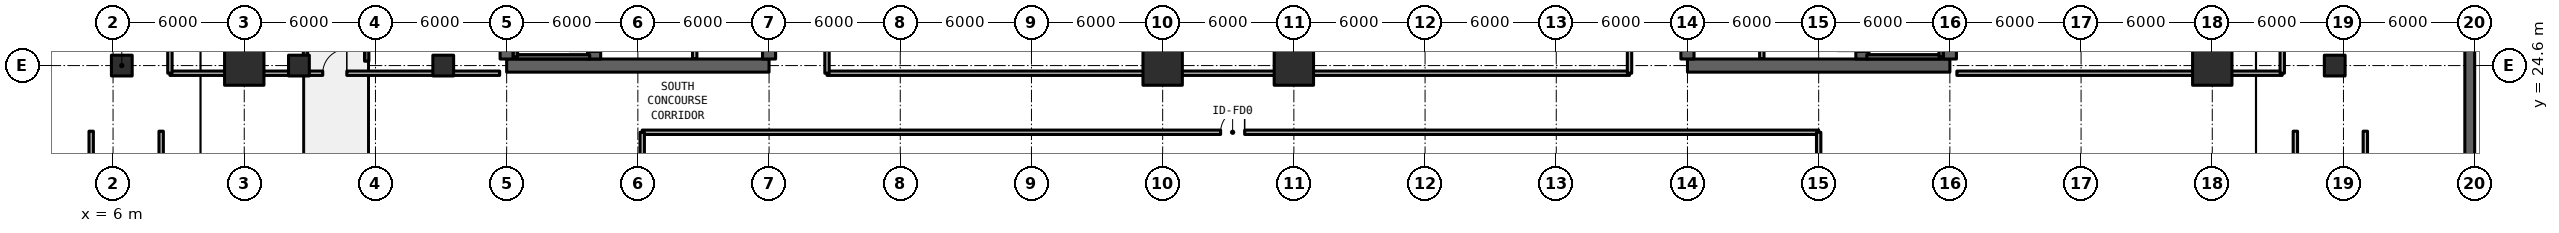
"""IFC4 building model, lengths in metres.
Left out: names, types, materials, properties, quantities, classifications, styles, units other than length and angle.
Written with IfcOpenShell. Run it as: python <this file> out.ifc"""

import sys

from ifc_helpers import new_model, si_unit, direction, frame, frame_2d, origin, origin_2d, place, context, subcontext, project, spatial, rectangle, extrude, element, fill, save


model = new_model("IFC4")
c1 = context("Model", 3, precision=1e-05, world=origin(), true_north=direction((0.0, 1.0)))
c2 = subcontext(c1, "Body", "Model", "MODEL_VIEW")
j1 = project(units=[si_unit("LENGTHUNIT", "METRE"), si_unit("PLANEANGLEUNIT", "RADIAN")], contexts=[c1])
p1 = place(None, origin())
s1 = spatial("IfcSite", under=j1, at=p1, CompositionType="ELEMENT")
p2 = place(p1, origin())
s2 = spatial("IfcBuilding", under=s1, at=p2, CompositionType="ELEMENT")
p3 = place(p2, frame((0.0, 0.0, -9.24)))
s3 = spatial("IfcBuildingStorey", under=s2, at=p3, CompositionType="ELEMENT", Elevation=-9.24)
p4 = place(p3, frame((24.0, 24.6, 0.0), z_axis=(0.0, 0.0, 1.0), x_axis=(1.0, 0.0, 0.0)))
e1 = element("IfcWall", 1, at=p4, inside=s3, PredefinedType="SHEAR", context=c2, shape_type="SweptSolid", body=[
    extrude(rectangle(XDim=12.0, YDim=0.6, at=frame_2d((6.0, 0.0))), origin(), (0.0, 0.0, 1.0), 4.62),
])
p5 = place(p3, frame((24.0, 24.9, 0.0), z_axis=(0.0, 0.0, 1.0), x_axis=(0.0, 1.0, 0.0)))
e2 = element("IfcWall", 2, at=p5, inside=s3, PredefinedType="SHEAR", context=c2, shape_type="SweptSolid", body=[
    extrude(rectangle(XDim=17.4, YDim=0.6, at=frame_2d((8.7, 0.0))), origin(), (0.0, 0.0, 1.0), 4.62),
])
p6 = place(p3, frame((36.0, 24.9, 0.0), z_axis=(0.0, 0.0, 1.0), x_axis=(0.0, 1.0, 0.0)))
e3 = element("IfcWall", 3, at=p6, inside=s3, PredefinedType="SHEAR", context=c2, shape_type="SweptSolid", body=[
    extrude(rectangle(XDim=8.9, YDim=0.6, at=frame_2d((4.45, 0.0))), origin(), (0.0, 0.0, 1.0), 4.62),
])
p7 = place(p3, frame((28.0, 24.9, 0.0), z_axis=(0.0, 0.0, 1.0), x_axis=(0.0, 1.0, 0.0)))
e4 = element("IfcWall", 4, at=p7, inside=s3, PredefinedType="SHEAR", context=c2, shape_type="SweptSolid", body=[
    extrude(rectangle(XDim=17.4, YDim=0.6, at=frame_2d((8.7, 0.0))), origin(), (0.0, 0.0, 1.0), 4.62),
])
p8 = place(p7, frame((0.35, 0.0, 0.0)))
e5 = element("IfcOpeningElement", 5, at=p8, cuts=e4, PredefinedType="OPENING", context=c2, shape_type="SweptSolid", body=[
    extrude(rectangle(XDim=1.15, YDim=2.15, at=frame_2d((0.575, 1.075))), frame((0.0, 0.31, 0.0), z_axis=(0.0, -1.0, 0.0), x_axis=(1.0, 0.0, 0.0)), (0.0, 0.0, 1.0), 0.62),
])
p9 = place(p7, frame((9.55, 0.0, 0.0)))
e6 = element("IfcOpeningElement", 6, at=p9, cuts=e4, PredefinedType="OPENING", context=c2, shape_type="SweptSolid", body=[
    extrude(rectangle(XDim=1.15, YDim=2.15, at=frame_2d((0.575, 1.075))), frame((0.0, 0.31, 0.0), z_axis=(0.0, -1.0, 0.0), x_axis=(1.0, 0.0, 0.0)), (0.0, 0.0, 1.0), 0.62),
])
p10 = place(p3, frame((78.0, 24.6, 0.0), z_axis=(0.0, 0.0, 1.0), x_axis=(1.0, 0.0, 0.0)))
e7 = element("IfcWall", 7, at=p10, inside=s3, PredefinedType="SHEAR", context=c2, shape_type="SweptSolid", body=[
    extrude(rectangle(XDim=12.0, YDim=0.6, at=frame_2d((6.0, 0.0))), origin(), (0.0, 0.0, 1.0), 4.62),
])
p11 = place(p3, frame((90.0, 24.9, 0.0), z_axis=(0.0, 0.0, 1.0), x_axis=(0.0, 1.0, 0.0)))
e8 = element("IfcWall", 8, at=p11, inside=s3, PredefinedType="SHEAR", context=c2, shape_type="SweptSolid", body=[
    extrude(rectangle(XDim=17.4, YDim=0.6, at=frame_2d((8.7, 0.0))), origin(), (0.0, 0.0, 1.0), 4.62),
])
p12 = place(p3, frame((78.0, 24.9, 0.0), z_axis=(0.0, 0.0, 1.0), x_axis=(0.0, 1.0, 0.0)))
e9 = element("IfcWall", 9, at=p12, inside=s3, PredefinedType="SHEAR", context=c2, shape_type="SweptSolid", body=[
    extrude(rectangle(XDim=8.9, YDim=0.6, at=frame_2d((4.45, 0.0))), origin(), (0.0, 0.0, 1.0), 4.62),
])
p13 = place(p3, frame((86.0, 24.9, 0.0), z_axis=(0.0, 0.0, 1.0), x_axis=(0.0, 1.0, 0.0)))
e10 = element("IfcWall", 10, at=p13, inside=s3, PredefinedType="SHEAR", context=c2, shape_type="SweptSolid", body=[
    extrude(rectangle(XDim=17.4, YDim=0.6, at=frame_2d((8.7, 0.0))), origin(), (0.0, 0.0, 1.0), 4.62),
])
p14 = place(p13, frame((0.35, 0.0, 0.0)))
e11 = element("IfcOpeningElement", 11, at=p14, cuts=e10, PredefinedType="OPENING", context=c2, shape_type="SweptSolid", body=[
    extrude(rectangle(XDim=1.15, YDim=2.15, at=frame_2d((0.575, 1.075))), frame((0.0, 0.31, 0.0), z_axis=(0.0, -1.0, 0.0), x_axis=(1.0, 0.0, 0.0)), (0.0, 0.0, 1.0), 0.62),
])
p15 = place(p13, frame((9.55, 0.0, 0.0)))
e12 = element("IfcOpeningElement", 12, at=p15, cuts=e10, PredefinedType="OPENING", context=c2, shape_type="SweptSolid", body=[
    extrude(rectangle(XDim=1.15, YDim=2.15, at=frame_2d((0.575, 1.075))), frame((0.0, 0.31, 0.0), z_axis=(0.0, -1.0, 0.0), x_axis=(1.0, 0.0, 0.0)), (0.0, 0.0, 1.0), 0.62),
])
for number, where, z_axis, x_axis in (
    (13, (12.0, 24.6, 0.0), (0.0, 0.0, 1.0), (1.0, 0.0, 0.0)),
    (14, (54.0, 24.6, 0.0), (0.0, 0.0, 1.0), (1.0, 0.0, 0.0)),
    (15, (60.0, 24.6, 0.0), (0.0, 0.0, 1.0), (1.0, 0.0, 0.0)),
    (16, (102.0, 24.6, 0.0), (0.0, 0.0, 1.0), (1.0, 0.0, 0.0)),
):
    element("IfcColumn", number, at=place(p3, frame(where, z_axis=z_axis, x_axis=x_axis)), inside=s3, PredefinedType="COLUMN", context=c2, shape_type="SweptSolid", body=[
        extrude(rectangle(XDim=1.8, YDim=1.8, at=origin_2d()), origin(), (0.0, 0.0, 1.0), 4.62),
    ])
for number, where, z_axis, x_axis in (
    (17, (6.4, 24.6, 0.0), (0.0, 0.0, 1.0), (1.0, 0.0, 0.0)),
    (18, (107.6, 24.6, 0.0), (0.0, 0.0, 1.0), (1.0, 0.0, 0.0)),
    (19, (14.5, 24.6, 0.0), (0.0, 0.0, 1.0), (1.0, 0.0, 0.0)),
    (20, (21.1, 24.6, 0.0), (0.0, 0.0, 1.0), (1.0, 0.0, 0.0)),
):
    element("IfcColumn", number, at=place(p3, frame(where, z_axis=z_axis, x_axis=x_axis)), inside=s3, PredefinedType="COLUMN", context=c2, shape_type="SweptSolid", body=[
        extrude(rectangle(XDim=0.95, YDim=0.95, at=origin_2d()), origin(), (0.0, 0.0, 1.0), 4.62),
    ])
p16 = place(p3, frame((113.775, 0.225, 0.0), z_axis=(0.0, 0.0, 1.0), x_axis=(0.0, 1.0, 0.0)))
e21 = element("IfcWall", 21, at=p16, inside=s3, PredefinedType="USERDEFINED", context=c2, shape_type="SweptSolid", body=[
    extrude(rectangle(XDim=66.75, YDim=0.45, at=frame_2d((33.375, 0.0))), origin(), (0.0, 0.0, 1.0), 4.32),
])
p17 = place(p3, frame((32.6, 24.92, 0.0), z_axis=(0.0, 0.0, 1.0), x_axis=(0.0, 1.0, 0.0)))
e22 = element("IfcWall", 22, at=p17, inside=s3, PredefinedType="SOLIDWALL", context=c2, shape_type="SweptSolid", body=[
    extrude(rectangle(XDim=3.58, YDim=0.2, at=frame_2d((1.79, 0.0))), origin(), (0.0, 0.0, 1.0), 3.54),
])
p18 = place(p17, frame((1.3, 0.0, 0.0)))
e23 = element("IfcOpeningElement", 23, at=p18, cuts=e22, PredefinedType="OPENING", context=c2, shape_type="SweptSolid", body=[
    extrude(rectangle(XDim=1.1, YDim=2.2, at=frame_2d((0.55, 1.1))), frame((0.0, 0.11, 0.0), z_axis=(0.0, -1.0, 0.0), x_axis=(1.0, 0.0, 0.0)), (0.0, 0.0, 1.0), 0.22),
])
p19 = place(p3, frame((81.4, 24.92, 0.0), z_axis=(0.0, 0.0, 1.0), x_axis=(0.0, 1.0, 0.0)))
e24 = element("IfcWall", 24, at=p19, inside=s3, PredefinedType="SOLIDWALL", context=c2, shape_type="SweptSolid", body=[
    extrude(rectangle(XDim=3.58, YDim=0.2, at=frame_2d((1.79, 0.0))), origin(), (0.0, 0.0, 1.0), 3.54),
])
p20 = place(p19, frame((1.3, 0.0, 0.0)))
e25 = element("IfcOpeningElement", 25, at=p20, cuts=e24, PredefinedType="OPENING", context=c2, shape_type="SweptSolid", body=[
    extrude(rectangle(XDim=1.1, YDim=2.2, at=frame_2d((0.55, 1.1))), frame((0.0, 0.11, 0.0), z_axis=(0.0, -1.0, 0.0), x_axis=(1.0, 0.0, 0.0)), (0.0, 0.0, 1.0), 0.22),
])
for number, where, z_axis, x_axis in (
    (26, (105.8, 15.9, 0.0), (0.0, 0.0, 1.0), (0.0, 1.0, 0.0)),
    (27, (109.0, 15.9, 0.0), (0.0, 0.0, 1.0), (0.0, 1.0, 0.0)),
    (28, (5.0, 15.9, 0.0), (0.0, 0.0, 1.0), (0.0, 1.0, 0.0)),
    (29, (8.2, 15.9, 0.0), (0.0, 0.0, 1.0), (0.0, 1.0, 0.0)),
):
    element("IfcWall", number, at=place(p3, frame(where, z_axis=z_axis, x_axis=x_axis)), inside=s3, PredefinedType="SOLIDWALL", context=c2, shape_type="SweptSolid", body=[
        extrude(rectangle(XDim=5.7, YDim=0.2, at=frame_2d((2.85, 0.0))), origin(), (0.0, 0.0, 1.0), 3.54),
    ])
p21 = place(p3, frame((30.2, 21.55, 0.0), z_axis=(0.0, 0.0, 1.0), x_axis=(1.0, 0.0, 0.0)))
e30 = element("IfcWall", 30, at=p21, inside=s3, PredefinedType="SOLIDWALL", context=c2, shape_type="SweptSolid", body=[
    extrude(rectangle(XDim=53.8, YDim=0.2, at=frame_2d((26.9, 0.0))), origin(), (0.0, 0.0, 1.0), 3.54),
])
p22 = place(p21, frame((26.45, 0.0, 0.0)))
e31 = element("IfcOpeningElement", 31, at=p22, cuts=e30, PredefinedType="OPENING", context=c2, shape_type="SweptSolid", body=[
    extrude(rectangle(XDim=1.1, YDim=2.15, at=frame_2d((0.55, 1.075))), frame((0.0, 0.11, 0.0), z_axis=(0.0, -1.0, 0.0), x_axis=(1.0, 0.0, 0.0)), (0.0, 0.0, 1.0), 0.22),
])
for number, where, z_axis, x_axis in (
    (32, (30.2, 0.45, 0.0), (0.0, 0.0, 1.0), (0.0, 1.0, 0.0)),
    (33, (84.0, 0.45, 0.0), (0.0, 0.0, 1.0), (0.0, 1.0, 0.0)),
):
    element("IfcWall", number, at=place(p3, frame(where, z_axis=z_axis, x_axis=x_axis)), inside=s3, PredefinedType="SOLIDWALL", context=c2, shape_type="SweptSolid", body=[
        extrude(rectangle(XDim=21.1, YDim=0.2, at=frame_2d((10.55, 0.0))), origin(), (0.0, 0.0, 1.0), 3.54),
    ])
p23 = place(p3, frame((38.65, 24.25, 0.0), z_axis=(0.0, 0.0, 1.0), x_axis=(1.0, 0.0, 0.0)))
e34 = element("IfcWall", 34, at=p23, inside=s3, PredefinedType="SOLIDWALL", context=c2, shape_type="SweptSolid", body=[
    extrude(rectangle(XDim=36.7, YDim=0.2, at=frame_2d((18.35, 0.0))), origin(), (0.0, 0.0, 1.0), 3.54),
])
p24 = place(p3, frame((38.65, 24.25, 0.0), z_axis=(0.0, 0.0, 1.0), x_axis=(0.0, 1.0, 0.0)))
e35 = element("IfcWall", 35, at=p24, inside=s3, PredefinedType="SOLIDWALL", context=c2, shape_type="SweptSolid", body=[
    extrude(rectangle(XDim=18.7, YDim=0.2, at=frame_2d((9.35, 0.0))), origin(), (0.0, 0.0, 1.0), 3.54),
])
p25 = place(p24, frame((8.45, 0.0, 0.0)))
e36 = element("IfcOpeningElement", 36, at=p25, cuts=e35, PredefinedType="OPENING", context=c2, shape_type="SweptSolid", body=[
    extrude(rectangle(XDim=1.1, YDim=2.15, at=frame_2d((0.55, 1.075))), frame((0.0, 0.11, 0.0), z_axis=(0.0, -1.0, 0.0), x_axis=(1.0, 0.0, 0.0)), (0.0, 0.0, 1.0), 0.22),
])
p26 = place(p3, frame((75.35, 24.25, 0.0), z_axis=(0.0, 0.0, 1.0), x_axis=(0.0, 1.0, 0.0)))
e37 = element("IfcWall", 37, at=p26, inside=s3, PredefinedType="SOLIDWALL", context=c2, shape_type="SweptSolid", body=[
    extrude(rectangle(XDim=18.7, YDim=0.2, at=frame_2d((9.35, 0.0))), origin(), (0.0, 0.0, 1.0), 3.54),
])
p27 = place(p3, frame((8.6, 24.25, 0.0), z_axis=(0.0, 0.0, 1.0), x_axis=(1.0, 0.0, 0.0)))
e38 = element("IfcWall", 38, at=p27, inside=s3, PredefinedType="SOLIDWALL", context=c2, shape_type="SweptSolid", body=[
    extrude(rectangle(XDim=15.08, YDim=0.2, at=frame_2d((7.54, 0.0))), origin(), (0.0, 0.0, 1.0), 3.54),
])
p28 = place(p27, frame((6.99, 0.0, 0.0)))
e39 = element("IfcOpeningElement", 39, at=p28, cuts=e38, PredefinedType="OPENING", context=c2, shape_type="SweptSolid", body=[
    extrude(rectangle(XDim=1.1, YDim=2.15, at=frame_2d((0.55, 1.075))), frame((0.0, 0.11, 0.0), z_axis=(0.0, -1.0, 0.0), x_axis=(1.0, 0.0, 0.0)), (0.0, 0.0, 1.0), 0.22),
])
p29 = place(p3, frame((8.6, 24.25, 0.0), z_axis=(0.0, 0.0, 1.0), x_axis=(0.0, 1.0, 0.0)))
e40 = element("IfcWall", 40, at=p29, inside=s3, PredefinedType="SOLIDWALL", context=c2, shape_type="SweptSolid", body=[
    extrude(rectangle(XDim=9.15, YDim=0.2, at=frame_2d((4.575, 0.0))), origin(), (0.0, 0.0, 1.0), 3.54),
])
p30 = place(p3, frame((90.32, 24.25, 0.0), z_axis=(0.0, 0.0, 1.0), x_axis=(1.0, 0.0, 0.0)))
e41 = element("IfcWall", 41, at=p30, inside=s3, PredefinedType="SOLIDWALL", context=c2, shape_type="SweptSolid", body=[
    extrude(rectangle(XDim=14.88, YDim=0.2, at=frame_2d((7.44, 0.0))), origin(), (0.0, 0.0, 1.0), 3.54),
])
p31 = place(p3, frame((105.2, 24.25, 0.0), z_axis=(0.0, 0.0, 1.0), x_axis=(0.0, 1.0, 0.0)))
e42 = element("IfcWall", 42, at=p31, inside=s3, PredefinedType="SOLIDWALL", context=c2, shape_type="SweptSolid", body=[
    extrude(rectangle(XDim=18.7, YDim=0.2, at=frame_2d((9.35, 0.0))), origin(), (0.0, 0.0, 1.0), 3.54),
])
p32 = place(p3, frame((24.4, 25.0, 0.0), z_axis=(0.0, 0.0, 1.0), x_axis=(1.0, 0.0, 0.0)))
e43 = element("IfcWall", 43, at=p32, inside=s3, PredefinedType="SOLIDWALL", context=c2, shape_type="SweptSolid", body=[
    extrude(rectangle(XDim=3.4, YDim=0.2, at=frame_2d((1.7, 0.0))), origin(), (0.0, 0.0, 1.0), 4.62),
])
p33 = place(p3, frame((24.4, 33.0, 0.0), z_axis=(0.0, 0.0, 1.0), x_axis=(0.0, -1.0, 0.0)))
e44 = element("IfcWall", 44, at=p33, inside=s3, PredefinedType="SOLIDWALL", context=c2, shape_type="SweptSolid", body=[
    extrude(rectangle(XDim=8.0, YDim=0.2, at=frame_2d((4.0, 0.0))), origin(), (0.0, 0.0, 1.0), 4.62),
])
p34 = place(p3, frame((86.2, 25.0, 0.0), z_axis=(0.0, 0.0, 1.0), x_axis=(1.0, 0.0, 0.0)))
e45 = element("IfcWall", 45, at=p34, inside=s3, PredefinedType="SOLIDWALL", context=c2, shape_type="SweptSolid", body=[
    extrude(rectangle(XDim=3.4, YDim=0.2, at=frame_2d((1.7, 0.0))), origin(), (0.0, 0.0, 1.0), 4.62),
])
p35 = place(p3, frame((89.6, 25.0, 0.0), z_axis=(0.0, 0.0, 1.0), x_axis=(0.0, 1.0, 0.0)))
e46 = element("IfcWall", 46, at=p35, inside=s3, PredefinedType="SOLIDWALL", context=c2, shape_type="SweptSolid", body=[
    extrude(rectangle(XDim=8.0, YDim=0.2, at=frame_2d((4.0, 0.0))), origin(), (0.0, 0.0, 1.0), 4.62),
])
for number, where, z_axis, x_axis in (
    (47, (14.8, 24.8, 0.0), (0.0, 0.0, 1.0), (0.0, 1.0, 0.0)),
    (48, (17.6, 24.8, 0.0), (0.0, 0.0, 1.0), (0.0, 1.0, 0.0)),
):
    element("IfcWall", number, at=place(p3, frame(where, z_axis=z_axis, x_axis=x_axis)), inside=s3, PredefinedType="SOLIDWALL", context=c2, shape_type="SweptSolid", body=[
        extrude(rectangle(XDim=5.6, YDim=0.2, at=frame_2d((2.8, 0.0))), origin(), (0.0, 0.0, 1.0), 4.37),
    ])
p36 = place(p22, origin())
e49 = element("IfcDoor", 49, at=p36, inside=s3, OperationType="SINGLE_SWING_RIGHT", PredefinedType="DOOR", context=c2, shape_type="SweptSolid", body=[
    extrude(rectangle(XDim=1.1, YDim=2.15, at=frame_2d((0.55, 1.075))), frame((0.0, 0.025, 0.0), z_axis=(0.0, -1.0, 0.0), x_axis=(1.0, 0.0, 0.0)), (0.0, 0.0, 1.0), 0.05),
])
fill(e31, e49)
p37 = place(p28, origin())
e50 = element("IfcDoor", 50, at=p37, inside=s3, OperationType="SINGLE_SWING_RIGHT", PredefinedType="DOOR", context=c2, shape_type="SweptSolid", body=[
    extrude(rectangle(XDim=1.1, YDim=2.15, at=frame_2d((0.55, 1.075))), frame((0.0, 0.025, 0.0), z_axis=(0.0, -1.0, 0.0), x_axis=(1.0, 0.0, 0.0)), (0.0, 0.0, 1.0), 0.05),
])
fill(e39, e50)
save(model, sys.argv[1])
